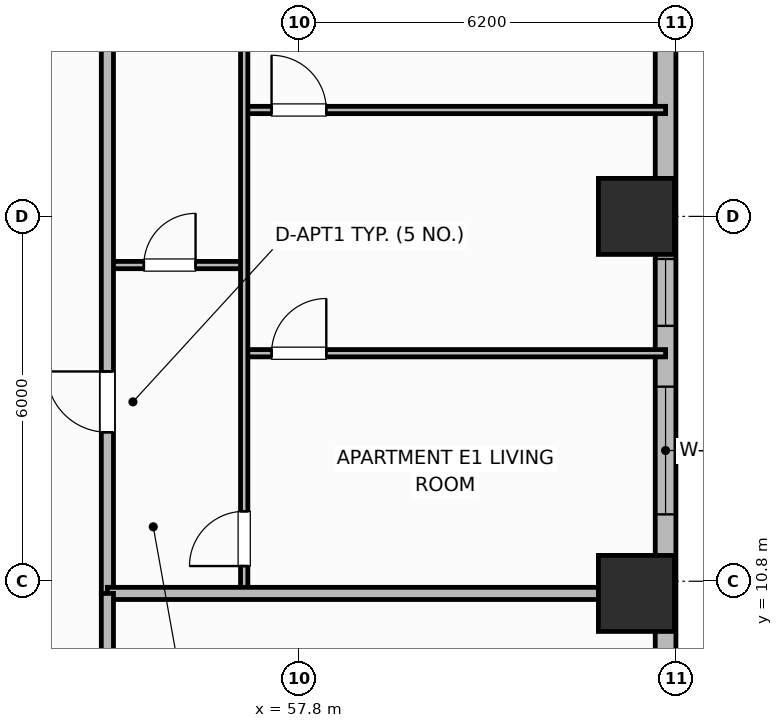
"""IFC4 building model, lengths in metres.
Left out: names, types, materials, properties, quantities, classifications, styles, units other than length and angle.
Written with IfcOpenShell. Run it as: python <this file> out.ifc"""

import sys

from ifc_helpers import new_model, si_unit, direction, frame, frame_2d, origin, origin_2d, place, context, subcontext, project, spatial, rectangle, extrude, element, fill, save


model = new_model("IFC4")
c1 = context("Model", 3, precision=1e-05, world=origin(), true_north=direction((0.0, 1.0)))
c2 = subcontext(c1, "Body", "Model", "MODEL_VIEW")
j1 = project(units=[si_unit("LENGTHUNIT", "METRE"), si_unit("PLANEANGLEUNIT", "RADIAN")], contexts=[c1])
p1 = place(None, origin())
s1 = spatial("IfcSite", under=j1, at=p1, CompositionType="ELEMENT")
p2 = place(p1, origin())
s2 = spatial("IfcBuilding", under=s1, at=p2, CompositionType="ELEMENT")
p3 = place(p2, frame((0.0, 0.0, 36.2)))
s3 = spatial("IfcBuildingStorey", under=s2, at=p3, CompositionType="ELEMENT", Elevation=36.2)
for number, where, z_axis, x_axis in (
    (1, (63.35, 10.6, 0.0), (0.0, 0.0, 1.0), (1.0, 0.0, 0.0)),
    (2, (63.35, 16.8, 0.0), (0.0, 0.0, 1.0), (1.0, 0.0, 0.0)),
):
    element("IfcColumn", number, at=place(p3, frame(where, z_axis=z_axis, x_axis=x_axis)), inside=s3, PredefinedType="COLUMN", context=c2, shape_type="SweptSolid", body=[
        extrude(rectangle(XDim=1.25, YDim=1.25, at=origin_2d()), origin(), (0.0, 0.0, 1.0), 3.7),
    ])
p4 = place(p3, frame((63.83, 9.0, 0.0), z_axis=(0.0, 0.0, 1.0), x_axis=(0.0, 1.0, 0.0)))
e3 = element("IfcWall", 3, at=p4, inside=s3, PredefinedType="SOLIDWALL", context=c2, shape_type="SweptSolid", body=[
    extrude(rectangle(XDim=14.8, YDim=0.34, at=frame_2d((7.4, 0.0))), origin(), (0.0, 0.0, 1.0), 2.7),
])
p5 = place(p4, frame((2.9, 0.0, 0.68)))
e4 = element("IfcOpeningElement", 4, at=p5, cuts=e3, PredefinedType="OPENING", context=c2, shape_type="SweptSolid", body=[
    extrude(rectangle(XDim=2.1, YDim=1.9, at=frame_2d((1.05, 0.95))), frame((0.0, 0.18, 0.0), z_axis=(0.0, -1.0, 0.0), x_axis=(1.0, 0.0, 0.0)), (0.0, 0.0, 1.0), 0.36),
])
p6 = place(p4, frame((6.0, 0.0, 0.89)))
e5 = element("IfcOpeningElement", 5, at=p6, cuts=e3, PredefinedType="OPENING", context=c2, shape_type="SweptSolid", body=[
    extrude(rectangle(XDim=1.1, YDim=1.65, at=frame_2d((0.55, 0.825))), frame((0.0, 0.18, 0.0), z_axis=(0.0, -1.0, 0.0), x_axis=(1.0, 0.0, 0.0)), (0.0, 0.0, 1.0), 0.36),
])
p7 = place(p4, frame((10.85, 0.0, 0.68)))
e6 = element("IfcOpeningElement", 6, at=p7, cuts=e3, PredefinedType="OPENING", context=c2, shape_type="SweptSolid", body=[
    extrude(rectangle(XDim=2.1, YDim=1.9, at=frame_2d((1.05, 0.95))), frame((0.0, 0.18, 0.0), z_axis=(0.0, -1.0, 0.0), x_axis=(1.0, 0.0, 0.0)), (0.0, 0.0, 1.0), 0.36),
])
p8 = place(p3, frame((54.65, 16.0, 0.0), z_axis=(0.0, 0.0, 1.0), x_axis=(1.0, 0.0, 0.0)))
e7 = element("IfcWall", 7, at=p8, inside=s3, PredefinedType="PARTITIONING", context=c2, shape_type="SweptSolid", body=[
    extrude(rectangle(XDim=2.25, YDim=0.12, at=frame_2d((1.125, 0.0))), origin(), (0.0, 0.0, 1.0), 2.53),
])
p9 = place(p8, frame((0.6, 0.0, 0.0)))
e8 = element("IfcOpeningElement", 8, at=p9, cuts=e7, PredefinedType="OPENING", context=c2, shape_type="SweptSolid", body=[
    extrude(rectangle(XDim=0.85, YDim=2.1, at=frame_2d((0.425, 1.05))), frame((0.0, 0.07, 0.0), z_axis=(0.0, -1.0, 0.0), x_axis=(1.0, 0.0, 0.0)), (0.0, 0.0, 1.0), 0.14),
])
p10 = place(p3, frame((56.9, 14.55, 0.0), z_axis=(0.0, 0.0, 1.0), x_axis=(1.0, 0.0, 0.0)))
e9 = element("IfcWall", 9, at=p10, inside=s3, PredefinedType="PARTITIONING", context=c2, shape_type="SweptSolid", body=[
    extrude(rectangle(XDim=6.93, YDim=0.12, at=frame_2d((3.465, 0.0))), origin(), (0.0, 0.0, 1.0), 2.53),
])
p11 = place(p10, frame((0.45, 0.0, 0.0)))
e10 = element("IfcOpeningElement", 10, at=p11, cuts=e9, PredefinedType="OPENING", context=c2, shape_type="SweptSolid", body=[
    extrude(rectangle(XDim=0.9, YDim=2.1, at=frame_2d((0.45, 1.05))), frame((0.0, 0.07, 0.0), z_axis=(0.0, -1.0, 0.0), x_axis=(1.0, 0.0, 0.0)), (0.0, 0.0, 1.0), 0.14),
])
p12 = place(p3, frame((56.9, 18.55, 0.0), z_axis=(0.0, 0.0, 1.0), x_axis=(1.0, 0.0, 0.0)))
e11 = element("IfcWall", 11, at=p12, inside=s3, PredefinedType="PARTITIONING", context=c2, shape_type="SweptSolid", body=[
    extrude(rectangle(XDim=6.93, YDim=0.12, at=frame_2d((3.465, 0.0))), origin(), (0.0, 0.0, 1.0), 2.53),
])
p13 = place(p12, frame((0.45, 0.0, 0.0)))
e12 = element("IfcOpeningElement", 12, at=p13, cuts=e11, PredefinedType="OPENING", context=c2, shape_type="SweptSolid", body=[
    extrude(rectangle(XDim=0.9, YDim=2.1, at=frame_2d((0.45, 1.05))), frame((0.0, 0.07, 0.0), z_axis=(0.0, -1.0, 0.0), x_axis=(1.0, 0.0, 0.0)), (0.0, 0.0, 1.0), 0.14),
])
p14 = place(p3, frame((56.9, 10.64, 0.0), z_axis=(0.0, 0.0, 1.0), x_axis=(0.0, 1.0, 0.0)))
e13 = element("IfcWall", 13, at=p14, inside=s3, PredefinedType="PARTITIONING", context=c2, shape_type="SweptSolid", body=[
    extrude(rectangle(XDim=15.92, YDim=0.12, at=frame_2d((7.96, 0.0))), origin(), (0.0, 0.0, 1.0), 2.53),
])
p15 = place(p14, frame((0.41, 0.0, 0.0)))
e14 = element("IfcOpeningElement", 14, at=p15, cuts=e13, PredefinedType="OPENING", context=c2, shape_type="SweptSolid", body=[
    extrude(rectangle(XDim=0.9, YDim=2.1, at=frame_2d((0.45, 1.05))), frame((0.0, 0.07, 0.0), z_axis=(0.0, -1.0, 0.0), x_axis=(1.0, 0.0, 0.0)), (0.0, 0.0, 1.0), 0.14),
])
p16 = place(p14, frame((13.125, 0.0, 0.0)))
e15 = element("IfcOpeningElement", 15, at=p16, cuts=e13, PredefinedType="OPENING", context=c2, shape_type="SweptSolid", body=[
    extrude(rectangle(XDim=0.82, YDim=2.08, at=frame_2d((0.41, 1.04))), frame((0.0, 0.07, 0.0), z_axis=(0.0, -1.0, 0.0), x_axis=(1.0, 0.0, 0.0)), (0.0, 0.0, 1.0), 0.14),
])
p17 = place(p3, frame((54.65, 10.6, 0.0), z_axis=(0.0, 0.0, 1.0), x_axis=(0.0, 1.0, 0.0)))
e16 = element("IfcWall", 16, at=p17, inside=s3, PredefinedType="PARTITIONING", context=c2, shape_type="SweptSolid", body=[
    extrude(rectangle(XDim=35.2, YDim=0.2, at=frame_2d((17.6, 0.0))), origin(), (0.0, 0.0, 1.0), 2.53),
])
p18 = place(p17, frame((2.65, 0.0, 0.0)))
e17 = element("IfcOpeningElement", 17, at=p18, cuts=e16, PredefinedType="OPENING", context=c2, shape_type="SweptSolid", body=[
    extrude(rectangle(XDim=1.0, YDim=2.15, at=frame_2d((0.5, 1.075))), frame((0.0, 0.11, 0.0), z_axis=(0.0, -1.0, 0.0), x_axis=(1.0, 0.0, 0.0)), (0.0, 0.0, 1.0), 0.22),
])
p19 = place(p17, frame((19.95, 0.0, 0.0)))
e18 = element("IfcOpeningElement", 18, at=p19, cuts=e16, PredefinedType="OPENING", context=c2, shape_type="SweptSolid", body=[
    extrude(rectangle(XDim=1.0, YDim=2.15, at=frame_2d((0.5, 1.075))), frame((0.0, 0.11, 0.0), z_axis=(0.0, -1.0, 0.0), x_axis=(1.0, 0.0, 0.0)), (0.0, 0.0, 1.0), 0.22),
])
p20 = place(p3, frame((54.65, 10.6, 0.0), z_axis=(0.0, 0.0, 1.0), x_axis=(1.0, 0.0, 0.0)))
e19 = element("IfcWall", 19, at=p20, inside=s3, PredefinedType="PARTITIONING", context=c2, shape_type="SweptSolid", body=[
    extrude(rectangle(XDim=8.76, YDim=0.2, at=frame_2d((4.38, 0.0))), origin(), (0.0, 0.0, 1.0), 2.53),
])
p21 = place(p3, frame((54.65, 4.97, 0.0), z_axis=(0.0, 0.0, 1.0), x_axis=(0.0, 1.0, 0.0)))
e20 = element("IfcWall", 20, at=p21, inside=s3, PredefinedType="PARTITIONING", context=c2, shape_type="SweptSolid", body=[
    extrude(rectangle(XDim=5.63, YDim=0.2, at=frame_2d((2.815, 0.0))), origin(), (0.0, 0.0, 1.0), 2.53),
])
p22 = place(p5, origin())
e21 = element("IfcWindow", 21, at=p22, inside=s3, PartitioningType="SINGLE_PANEL", PredefinedType="WINDOW", context=c2, shape_type="SweptSolid", body=[
    extrude(rectangle(XDim=2.1, YDim=1.9, at=frame_2d((1.05, 0.95))), frame((0.0, 0.03, 0.0), z_axis=(0.0, -1.0, 0.0), x_axis=(1.0, 0.0, 0.0)), (0.0, 0.0, 1.0), 0.06),
])
fill(e4, e21)
p23 = place(p6, origin())
e22 = element("IfcWindow", 22, at=p23, inside=s3, PartitioningType="SINGLE_PANEL", PredefinedType="WINDOW", context=c2, shape_type="SweptSolid", body=[
    extrude(rectangle(XDim=1.1, YDim=1.65, at=frame_2d((0.55, 0.825))), frame((0.0, 0.03, 0.0), z_axis=(0.0, -1.0, 0.0), x_axis=(1.0, 0.0, 0.0)), (0.0, 0.0, 1.0), 0.06),
])
fill(e5, e22)
p24 = place(p9, origin())
e23 = element("IfcDoor", 23, at=p24, inside=s3, OperationType="SINGLE_SWING_RIGHT", PredefinedType="DOOR", context=c2, shape_type="SweptSolid", body=[
    extrude(rectangle(XDim=0.85, YDim=2.1, at=frame_2d((0.425, 1.05))), frame((0.0, 0.025, 0.0), z_axis=(0.0, -1.0, 0.0), x_axis=(1.0, 0.0, 0.0)), (0.0, 0.0, 1.0), 0.05),
])
fill(e8, e23)
p25 = place(p11, origin())
e24 = element("IfcDoor", 24, at=p25, inside=s3, OperationType="SINGLE_SWING_RIGHT", PredefinedType="DOOR", context=c2, shape_type="SweptSolid", body=[
    extrude(rectangle(XDim=0.9, YDim=2.1, at=frame_2d((0.45, 1.05))), frame((0.0, 0.025, 0.0), z_axis=(0.0, -1.0, 0.0), x_axis=(1.0, 0.0, 0.0)), (0.0, 0.0, 1.0), 0.05),
])
fill(e10, e24)
p26 = place(p13, origin())
e25 = element("IfcDoor", 25, at=p26, inside=s3, OperationType="SINGLE_SWING_LEFT", PredefinedType="DOOR", context=c2, shape_type="SweptSolid", body=[
    extrude(rectangle(XDim=0.9, YDim=2.1, at=frame_2d((0.45, 1.05))), frame((0.0, 0.025, 0.0), z_axis=(0.0, -1.0, 0.0), x_axis=(1.0, 0.0, 0.0)), (0.0, 0.0, 1.0), 0.05),
])
fill(e12, e25)
p27 = place(p15, origin())
e26 = element("IfcDoor", 26, at=p27, inside=s3, OperationType="SINGLE_SWING_LEFT", PredefinedType="DOOR", context=c2, shape_type="SweptSolid", body=[
    extrude(rectangle(XDim=0.9, YDim=2.1, at=frame_2d((0.45, 1.05))), frame((0.0, 0.025, 0.0), z_axis=(0.0, -1.0, 0.0), x_axis=(1.0, 0.0, 0.0)), (0.0, 0.0, 1.0), 0.05),
])
fill(e14, e26)
p28 = place(p18, origin())
e27 = element("IfcDoor", 27, at=p28, inside=s3, OperationType="SINGLE_SWING_RIGHT", PredefinedType="DOOR", context=c2, shape_type="SweptSolid", body=[
    extrude(rectangle(XDim=1.0, YDim=2.15, at=frame_2d((0.5, 1.075))), frame((0.0, 0.025, 0.0), z_axis=(0.0, -1.0, 0.0), x_axis=(1.0, 0.0, 0.0)), (0.0, 0.0, 1.0), 0.05),
])
fill(e17, e27)
save(model, sys.argv[1])
